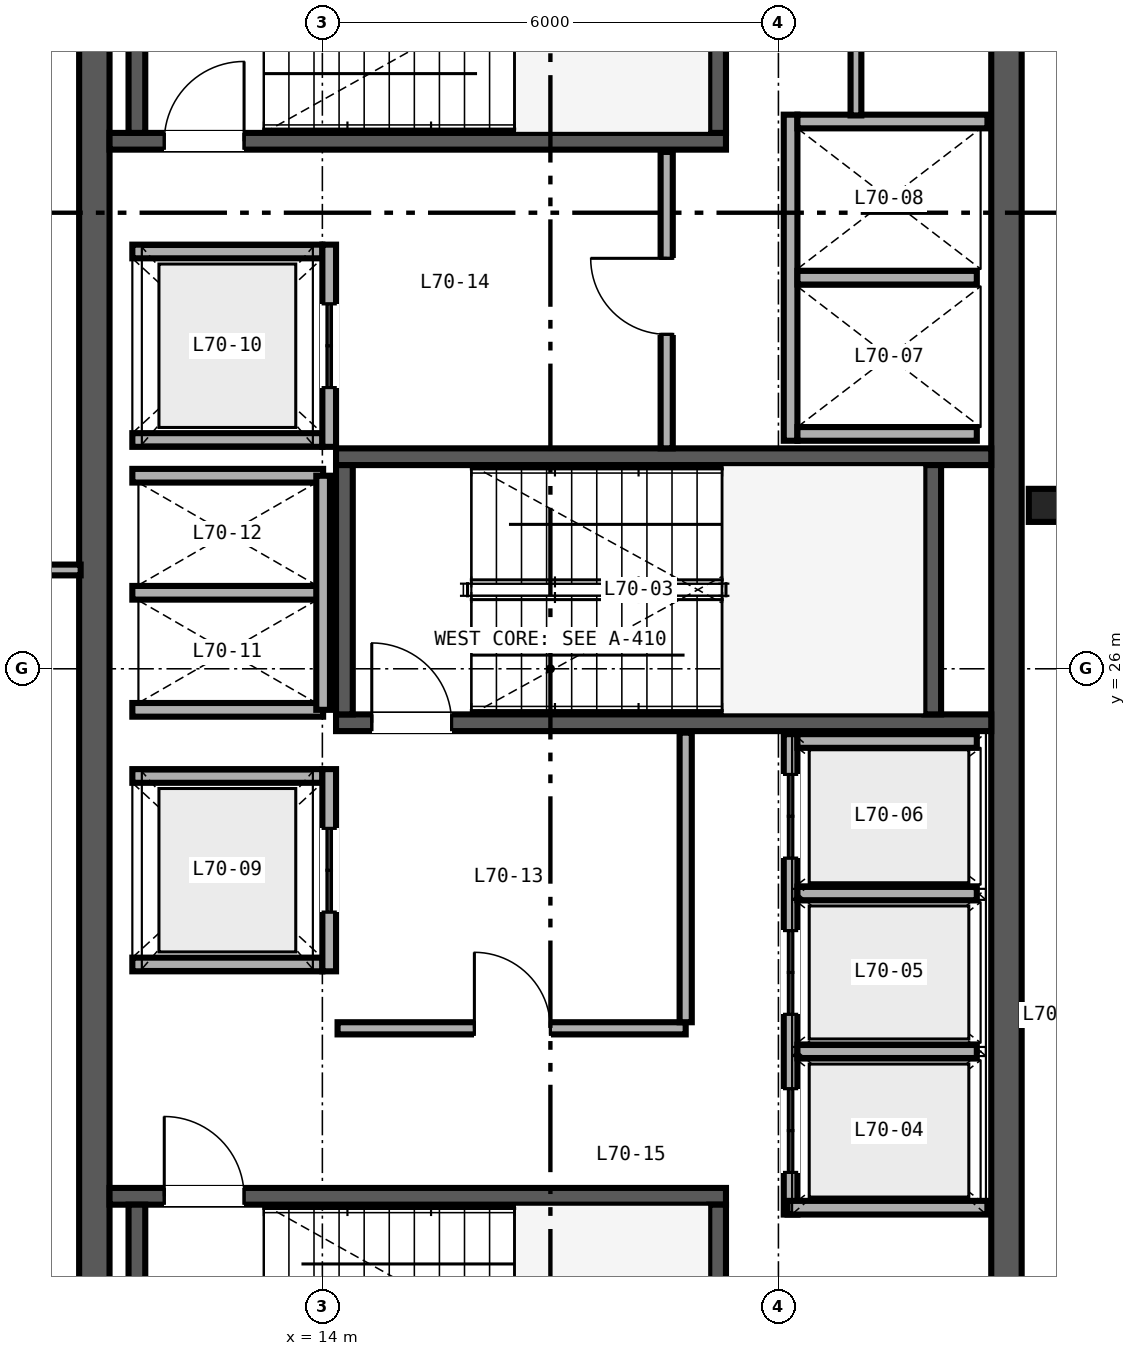
"""IFC4 building model, lengths in metres.
Left out: names, types, materials, properties, quantities, classifications, styles, units other than length and angle.
Written with IfcOpenShell. Run it as: python <this file> out.ifc"""

import sys

from ifc_helpers import new_model, si_unit, direction, frame, frame_2d, origin, origin_2d, place, context, subcontext, project, spatial, rectangle, i_section, extrude, source, transform, mapped, element, fill, save


model = new_model("IFC4")
c1 = context("Model", 3, precision=1e-05, world=origin(), true_north=direction((0.0, 1.0)))
c2 = subcontext(c1, "Body", "Model", "MODEL_VIEW")
j1 = project(units=[si_unit("LENGTHUNIT", "METRE"), si_unit("PLANEANGLEUNIT", "RADIAN")], contexts=[c1])
p1 = place(None, origin())
s1 = spatial("IfcSite", under=j1, at=p1, CompositionType="ELEMENT")
p2 = place(p1, origin())
s2 = spatial("IfcBuilding", under=s1, at=p2, CompositionType="ELEMENT")
p3 = place(p2, frame((0.0, 0.0, 276.0)))
s3 = spatial("IfcBuildingStorey", under=s2, at=p3, CompositionType="ELEMENT", Elevation=276.0)
for number, where, z_axis, x_axis in (
    (1, (11.0, 15.2, 0.0), (0.0, 0.0, 1.0), (0.0, 1.0, 0.0)),
    (2, (23.0, 15.2, 0.0), (0.0, 0.0, 1.0), (0.0, 1.0, 0.0)),
):
    element("IfcWall", number, at=place(p3, frame(where, z_axis=z_axis, x_axis=x_axis)), inside=s3, PredefinedType="SHEAR", context=c2, shape_type="SweptSolid", body=[
        extrude(rectangle(XDim=21.6, YDim=0.4, at=frame_2d((10.8, 0.0))), origin(), (0.0, 0.0, 1.0), 3.38),
    ])
p4 = place(p3, frame((11.2, 19.06, 0.0), z_axis=(0.0, 0.0, 1.0), x_axis=(1.0, 0.0, 0.0)))
e3 = element("IfcWall", 3, at=p4, inside=s3, PredefinedType="SHEAR", context=c2, shape_type="SweptSolid", body=[
    extrude(rectangle(XDim=8.11, YDim=0.22, at=frame_2d((4.055, 0.0))), origin(), (0.0, 0.0, 1.0), 3.4),
])
p5 = place(p4, frame((0.72, 0.0, 0.0)))
e4 = element("IfcOpeningElement", 4, at=p5, cuts=e3, PredefinedType="OPENING", context=c2, shape_type="SweptSolid", body=[
    extrude(rectangle(XDim=1.05, YDim=2.15, at=frame_2d((0.525, 1.075))), frame((0.0, 0.12, 0.0), z_axis=(0.0, -1.0, 0.0), x_axis=(1.0, 0.0, 0.0)), (0.0, 0.0, 1.0), 0.24),
])
for number, where, z_axis, x_axis in (
    (5, (11.56, 15.67, 0.0), (0.0, 0.0, 1.0), (0.0, 1.0, 0.0)),
    (6, (19.2, 15.67, 0.0), (0.0, 0.0, 1.0), (0.0, 1.0, 0.0)),
):
    element("IfcWall", number, at=place(p3, frame(where, z_axis=z_axis, x_axis=x_axis)), inside=s3, PredefinedType="SHEAR", context=c2, shape_type="SweptSolid", body=[
        extrude(rectangle(XDim=3.28, YDim=0.22, at=frame_2d((1.64, 0.0))), origin(), (0.0, 0.0, 1.0), 3.4),
    ])
p6 = place(p3, frame((11.2, 32.94, 0.0), z_axis=(0.0, 0.0, 1.0), x_axis=(1.0, 0.0, 0.0)))
e7 = element("IfcWall", 7, at=p6, inside=s3, PredefinedType="SHEAR", context=c2, shape_type="SweptSolid", body=[
    extrude(rectangle(XDim=8.11, YDim=0.22, at=frame_2d((4.055, 0.0))), origin(), (0.0, 0.0, 1.0), 3.4),
])
p7 = place(p6, frame((0.72, 0.0, 0.0)))
e8 = element("IfcOpeningElement", 8, at=p7, cuts=e7, PredefinedType="OPENING", context=c2, shape_type="SweptSolid", body=[
    extrude(rectangle(XDim=1.05, YDim=2.15, at=frame_2d((0.525, 1.075))), frame((0.0, 0.12, 0.0), z_axis=(0.0, -1.0, 0.0), x_axis=(1.0, 0.0, 0.0)), (0.0, 0.0, 1.0), 0.24),
])
for number, where, z_axis, x_axis in (
    (9, (11.56, 33.05, 0.0), (0.0, 0.0, 1.0), (0.0, 1.0, 0.0)),
    (10, (19.2, 33.05, 0.0), (0.0, 0.0, 1.0), (0.0, 1.0, 0.0)),
):
    element("IfcWall", number, at=place(p3, frame(where, z_axis=z_axis, x_axis=x_axis)), inside=s3, PredefinedType="SHEAR", context=c2, shape_type="SweptSolid", body=[
        extrude(rectangle(XDim=3.28, YDim=0.22, at=frame_2d((1.64, 0.0))), origin(), (0.0, 0.0, 1.0), 3.4),
    ])
p8 = place(p3, frame((14.18, 25.29, 0.0), z_axis=(0.0, 0.0, 1.0), x_axis=(1.0, 0.0, 0.0)))
e11 = element("IfcWall", 11, at=p8, inside=s3, PredefinedType="SHEAR", context=c2, shape_type="SweptSolid", body=[
    extrude(rectangle(XDim=8.62, YDim=0.22, at=frame_2d((4.31, 0.0))), origin(), (0.0, 0.0, 1.0), 3.4),
])
p9 = place(p8, frame((0.47, 0.0, 0.0)))
e12 = element("IfcOpeningElement", 12, at=p9, cuts=e11, PredefinedType="OPENING", context=c2, shape_type="SweptSolid", body=[
    extrude(rectangle(XDim=1.05, YDim=2.15, at=frame_2d((0.525, 1.075))), frame((0.0, 0.12, 0.0), z_axis=(0.0, -1.0, 0.0), x_axis=(1.0, 0.0, 0.0)), (0.0, 0.0, 1.0), 0.24),
])
p10 = place(p3, frame((14.18, 28.79, 0.0), z_axis=(0.0, 0.0, 1.0), x_axis=(1.0, 0.0, 0.0)))
e13 = element("IfcWall", 13, at=p10, inside=s3, PredefinedType="SHEAR", context=c2, shape_type="SweptSolid", body=[
    extrude(rectangle(XDim=8.62, YDim=0.22, at=frame_2d((4.31, 0.0))), origin(), (0.0, 0.0, 1.0), 3.4),
])
for number, where, z_axis, x_axis in (
    (14, (14.29, 25.4, 0.0), (0.0, 0.0, 1.0), (0.0, 1.0, 0.0)),
    (15, (22.03, 25.4, 0.0), (0.0, 0.0, 1.0), (0.0, 1.0, 0.0)),
):
    element("IfcWall", number, at=place(p3, frame(where, z_axis=z_axis, x_axis=x_axis)), inside=s3, PredefinedType="SHEAR", context=c2, shape_type="SweptSolid", body=[
        extrude(rectangle(XDim=3.28, YDim=0.22, at=frame_2d((1.64, 0.0))), origin(), (0.0, 0.0, 1.0), 3.4),
    ])
m1 = source(origin(), c2, "Body", "SweptSolid", [
    extrude(i_section(OverallWidth=0.412, OverallDepth=0.435, WebThickness=0.036, FlangeThickness=0.057, FilletRadius=0.025, at=origin_2d()), origin(), (0.0, 0.0, 1.0), 3.38),
])
p11 = place(p3, frame((23.5, 28.15, 0.0), z_axis=(0.0, 0.0, 1.0), x_axis=(1.0, 0.0, 0.0)))
e16 = element("IfcColumn", 16, at=p11, inside=s3, PredefinedType="COLUMN", context=c2, shape_type="MappedRepresentation", body=[
    mapped(m1, transform((0.0, 0.0, 0.0), scale=1.0)),
])
p12 = place(p3, frame((20.16, 18.82, 0.0), z_axis=(0.0, 0.0, 1.0), x_axis=(0.0, 1.0, 0.0)))
e17 = element("IfcWall", 17, at=p12, inside=s3, PredefinedType="SOLIDWALL", context=c2, shape_type="SweptSolid", body=[
    extrude(rectangle(XDim=6.32, YDim=0.18, at=frame_2d((3.16, 0.0))), origin(), (0.0, 0.0, 1.0), 2.48),
])
p13 = place(p12, frame((0.555, 0.0, 0.0)))
e18 = element("IfcOpeningElement", 18, at=p13, cuts=e17, PredefinedType="OPENING", context=c2, shape_type="SweptSolid", body=[
    extrude(rectangle(XDim=1.1, YDim=2.2, at=frame_2d((0.55, 1.1))), frame((0.0, 0.1, 0.0), z_axis=(0.0, -1.0, 0.0), x_axis=(1.0, 0.0, 0.0)), (0.0, 0.0, 1.0), 0.2),
])
p14 = place(p12, frame((2.635, 0.0, 0.0)))
e19 = element("IfcOpeningElement", 19, at=p14, cuts=e17, PredefinedType="OPENING", context=c2, shape_type="SweptSolid", body=[
    extrude(rectangle(XDim=1.1, YDim=2.2, at=frame_2d((0.55, 1.1))), frame((0.0, 0.1, 0.0), z_axis=(0.0, -1.0, 0.0), x_axis=(1.0, 0.0, 0.0)), (0.0, 0.0, 1.0), 0.2),
])
p15 = place(p12, frame((4.69, 0.0, 0.0)))
e20 = element("IfcOpeningElement", 20, at=p15, cuts=e17, PredefinedType="OPENING", context=c2, shape_type="SweptSolid", body=[
    extrude(rectangle(XDim=1.1, YDim=2.2, at=frame_2d((0.55, 1.1))), frame((0.0, 0.1, 0.0), z_axis=(0.0, -1.0, 0.0), x_axis=(1.0, 0.0, 0.0)), (0.0, 0.0, 1.0), 0.2),
])
p16 = place(p3, frame((20.12, 18.91, 0.0), z_axis=(0.0, 0.0, 1.0), x_axis=(1.0, 0.0, 0.0)))
e21 = element("IfcWall", 21, at=p16, inside=s3, PredefinedType="SOLIDWALL", context=c2, shape_type="SweptSolid", body=[
    extrude(rectangle(XDim=2.63, YDim=0.18, at=frame_2d((1.315, 0.0))), origin(), (0.0, 0.0, 1.0), 3.38),
])
p17 = place(p3, frame((20.25, 25.05, 0.0), z_axis=(0.0, 0.0, 1.0), x_axis=(1.0, 0.0, 0.0)))
e22 = element("IfcWall", 22, at=p17, inside=s3, PredefinedType="SOLIDWALL", context=c2, shape_type="SweptSolid", body=[
    extrude(rectangle(XDim=2.36, YDim=0.18, at=frame_2d((1.18, 0.0))), origin(), (0.0, 0.0, 1.0), 3.38),
])
p18 = place(p3, frame((20.25, 20.965, 0.0), z_axis=(0.0, 0.0, 1.0), x_axis=(1.0, 0.0, 0.0)))
e23 = element("IfcWall", 23, at=p18, inside=s3, PredefinedType="SOLIDWALL", context=c2, shape_type="SweptSolid", body=[
    extrude(rectangle(XDim=2.36, YDim=0.18, at=frame_2d((1.18, 0.0))), origin(), (0.0, 0.0, 1.0), 2.48),
])
p19 = place(p3, frame((20.25, 23.045, 0.0), z_axis=(0.0, 0.0, 1.0), x_axis=(1.0, 0.0, 0.0)))
e24 = element("IfcWall", 24, at=p19, inside=s3, PredefinedType="SOLIDWALL", context=c2, shape_type="SweptSolid", body=[
    extrude(rectangle(XDim=2.36, YDim=0.18, at=frame_2d((1.18, 0.0))), origin(), (0.0, 0.0, 1.0), 3.38),
])
p20 = place(p3, frame((20.16, 29.0, 0.0), z_axis=(0.0, 0.0, 1.0), x_axis=(0.0, 1.0, 0.0)))
e25 = element("IfcWall", 25, at=p20, inside=s3, PredefinedType="SOLIDWALL", context=c2, shape_type="SweptSolid", body=[
    extrude(rectangle(XDim=4.29, YDim=0.18, at=frame_2d((2.145, 0.0))), origin(), (0.0, 0.0, 1.0), 3.38),
])
p21 = place(p3, frame((20.25, 29.09, 0.0), z_axis=(0.0, 0.0, 1.0), x_axis=(1.0, 0.0, 0.0)))
e26 = element("IfcWall", 26, at=p21, inside=s3, PredefinedType="SOLIDWALL", context=c2, shape_type="SweptSolid", body=[
    extrude(rectangle(XDim=2.36, YDim=0.18, at=frame_2d((1.18, 0.0))), origin(), (0.0, 0.0, 1.0), 3.38),
])
p22 = place(p3, frame((20.25, 33.2, 0.0), z_axis=(0.0, 0.0, 1.0), x_axis=(1.0, 0.0, 0.0)))
e27 = element("IfcWall", 27, at=p22, inside=s3, PredefinedType="SOLIDWALL", context=c2, shape_type="SweptSolid", body=[
    extrude(rectangle(XDim=2.5, YDim=0.18, at=frame_2d((1.25, 0.0))), origin(), (0.0, 0.0, 1.0), 3.38),
])
p23 = place(p3, frame((20.25, 31.145, 0.0), z_axis=(0.0, 0.0, 1.0), x_axis=(1.0, 0.0, 0.0)))
e28 = element("IfcWall", 28, at=p23, inside=s3, PredefinedType="SOLIDWALL", context=c2, shape_type="SweptSolid", body=[
    extrude(rectangle(XDim=2.36, YDim=0.18, at=frame_2d((1.18, 0.0))), origin(), (0.0, 0.0, 1.0), 3.38),
])
for number, where, z_axis, x_axis in (
    (29, (11.5, 22.11, 0.0), (0.0, 0.0, 1.0), (1.0, 0.0, 0.0)),
    (30, (11.5, 24.59, 0.0), (0.0, 0.0, 1.0), (1.0, 0.0, 0.0)),
):
    element("IfcWall", number, at=place(p3, frame(where, z_axis=z_axis, x_axis=x_axis)), inside=s3, PredefinedType="SOLIDWALL", context=c2, shape_type="SweptSolid", body=[
        extrude(rectangle(XDim=2.5, YDim=0.18, at=frame_2d((1.25, 0.0))), origin(), (0.0, 0.0, 1.0), 3.38),
    ])
p24 = place(p3, frame((14.09, 22.02, 0.0), z_axis=(0.0, 0.0, 1.0), x_axis=(0.0, 1.0, 0.0)))
e31 = element("IfcWall", 31, at=p24, inside=s3, PredefinedType="SOLIDWALL", context=c2, shape_type="SweptSolid", body=[
    extrude(rectangle(XDim=2.66, YDim=0.18, at=frame_2d((1.33, 0.0))), origin(), (0.0, 0.0, 1.0), 3.38),
])
p25 = place(p24, frame((0.78, 0.0, 0.0)))
e32 = element("IfcOpeningElement", 32, at=p25, cuts=e31, PredefinedType="OPENING", context=c2, shape_type="SweptSolid", body=[
    extrude(rectangle(XDim=1.1, YDim=2.2, at=frame_2d((0.55, 1.1))), frame((0.0, 0.1, 0.0), z_axis=(0.0, -1.0, 0.0), x_axis=(1.0, 0.0, 0.0)), (0.0, 0.0, 1.0), 0.2),
])
for number, where, z_axis, x_axis in (
    (33, (11.5, 29.01, 0.0), (0.0, 0.0, 1.0), (1.0, 0.0, 0.0)),
    (34, (11.5, 31.49, 0.0), (0.0, 0.0, 1.0), (1.0, 0.0, 0.0)),
):
    element("IfcWall", number, at=place(p3, frame(where, z_axis=z_axis, x_axis=x_axis)), inside=s3, PredefinedType="SOLIDWALL", context=c2, shape_type="SweptSolid", body=[
        extrude(rectangle(XDim=2.5, YDim=0.18, at=frame_2d((1.25, 0.0))), origin(), (0.0, 0.0, 1.0), 3.38),
    ])
p26 = place(p3, frame((14.09, 28.92, 0.0), z_axis=(0.0, 0.0, 1.0), x_axis=(0.0, 1.0, 0.0)))
e35 = element("IfcWall", 35, at=p26, inside=s3, PredefinedType="SOLIDWALL", context=c2, shape_type="SweptSolid", body=[
    extrude(rectangle(XDim=2.66, YDim=0.18, at=frame_2d((1.33, 0.0))), origin(), (0.0, 0.0, 1.0), 3.38),
])
p27 = place(p26, frame((0.78, 0.0, 0.0)))
e36 = element("IfcOpeningElement", 36, at=p27, cuts=e35, PredefinedType="OPENING", context=c2, shape_type="SweptSolid", body=[
    extrude(rectangle(XDim=1.1, YDim=2.2, at=frame_2d((0.55, 1.1))), frame((0.0, 0.1, 0.0), z_axis=(0.0, -1.0, 0.0), x_axis=(1.0, 0.0, 0.0)), (0.0, 0.0, 1.0), 0.2),
])
for number, where, z_axis, x_axis in (
    (37, (11.5, 25.46, 0.0), (0.0, 0.0, 1.0), (1.0, 0.0, 0.0)),
    (38, (11.5, 27.0, 0.0), (0.0, 0.0, 1.0), (1.0, 0.0, 0.0)),
    (39, (11.5, 28.54, 0.0), (0.0, 0.0, 1.0), (1.0, 0.0, 0.0)),
):
    element("IfcWall", number, at=place(p3, frame(where, z_axis=z_axis, x_axis=x_axis)), inside=s3, PredefinedType="SOLIDWALL", context=c2, shape_type="SweptSolid", body=[
        extrude(rectangle(XDim=2.51, YDim=0.18, at=frame_2d((1.255, 0.0))), origin(), (0.0, 0.0, 1.0), 3.38),
    ])
p28 = place(p3, frame((14.01, 25.46, 0.0), z_axis=(0.0, 0.0, 1.0), x_axis=(0.0, 1.0, 0.0)))
e40 = element("IfcWall", 40, at=p28, inside=s3, PredefinedType="SOLIDWALL", context=c2, shape_type="SweptSolid", body=[
    extrude(rectangle(XDim=3.08, YDim=0.18, at=frame_2d((1.54, 0.0))), origin(), (0.0, 0.0, 1.0), 3.38),
])
p29 = place(p3, frame((14.2, 21.27, 0.0), z_axis=(0.0, 0.0, 1.0), x_axis=(1.0, 0.0, 0.0)))
e41 = element("IfcWall", 41, at=p29, inside=s3, PredefinedType="PARTITIONING", context=c2, shape_type="SweptSolid", body=[
    extrude(rectangle(XDim=4.58, YDim=0.16, at=frame_2d((2.29, 0.0))), origin(), (0.0, 0.0, 1.0), 3.38),
])
p30 = place(p29, frame((1.8, 0.0, 0.0)))
e42 = element("IfcOpeningElement", 42, at=p30, cuts=e41, PredefinedType="OPENING", context=c2, shape_type="SweptSolid", body=[
    extrude(rectangle(XDim=1.0, YDim=2.15, at=frame_2d((0.5, 1.075))), frame((0.0, 0.09, 0.0), z_axis=(0.0, -1.0, 0.0), x_axis=(1.0, 0.0, 0.0)), (0.0, 0.0, 1.0), 0.18),
])
p31 = place(p3, frame((18.78, 21.35, 0.0), z_axis=(0.0, 0.0, 1.0), x_axis=(0.0, 1.0, 0.0)))
e43 = element("IfcWall", 43, at=p31, inside=s3, PredefinedType="PARTITIONING", context=c2, shape_type="SweptSolid", body=[
    extrude(rectangle(XDim=3.81, YDim=0.16, at=frame_2d((1.905, 0.0))), origin(), (0.0, 0.0, 1.0), 3.38),
])
p32 = place(p3, frame((18.53, 28.9, 0.0), z_axis=(0.0, 0.0, 1.0), x_axis=(0.0, 1.0, 0.0)))
e44 = element("IfcWall", 44, at=p32, inside=s3, PredefinedType="PARTITIONING", context=c2, shape_type="SweptSolid", body=[
    extrude(rectangle(XDim=3.9, YDim=0.16, at=frame_2d((1.95, 0.0))), origin(), (0.0, 0.0, 1.0), 3.38),
])
p33 = place(p32, frame((1.5, 0.0, 0.0)))
e45 = element("IfcOpeningElement", 45, at=p33, cuts=e44, PredefinedType="OPENING", context=c2, shape_type="SweptSolid", body=[
    extrude(rectangle(XDim=1.0, YDim=2.15, at=frame_2d((0.5, 1.075))), frame((0.0, 0.09, 0.0), z_axis=(0.0, -1.0, 0.0), x_axis=(1.0, 0.0, 0.0)), (0.0, 0.0, 1.0), 0.18),
])
p34 = place(p3, frame((21.02, 33.28, 0.0), z_axis=(0.0, 0.0, 1.0), x_axis=(0.0, 1.0, 0.0)))
e46 = element("IfcWall", 46, at=p34, inside=s3, PredefinedType="PARTITIONING", context=c2, shape_type="SweptSolid", body=[
    extrude(rectangle(XDim=3.47, YDim=0.142, at=frame_2d((1.735, 0.0))), origin(), (0.0, 0.0, 1.0), 3.38),
])
p35 = place(p34, frame((1.15, 0.0, 0.0)))
e47 = element("IfcOpeningElement", 47, at=p35, cuts=e46, PredefinedType="OPENING", context=c2, shape_type="SweptSolid", body=[
    extrude(rectangle(XDim=0.84, YDim=2.1, at=frame_2d((0.42, 1.05))), frame((0.0, 0.081, 0.0), z_axis=(0.0, -1.0, 0.0), x_axis=(1.0, 0.0, 0.0)), (0.0, 0.0, 1.0), 0.162),
])
p36 = place(p3, frame((8.16, 27.3, 0.0), z_axis=(0.0, 0.0, 1.0), x_axis=(1.0, 0.0, 0.0)))
e48 = element("IfcWall", 48, at=p36, inside=s3, PredefinedType="PARTITIONING", context=c2, shape_type="SweptSolid", body=[
    extrude(rectangle(XDim=2.66, YDim=0.142, at=frame_2d((1.33, 0.0))), origin(), (0.0, 0.0, 1.0), 2.601),
])
m2 = source(origin(), c2, "Body", "SweptSolid", [
    extrude(rectangle(XDim=1.05, YDim=2.15, at=frame_2d((0.525, 1.075))), frame((0.0, 0.025, 0.0), z_axis=(0.0, -1.0, 0.0), x_axis=(1.0, 0.0, 0.0)), (0.0, 0.0, 1.0), 0.05),
])
p37 = place(p5, origin())
e49 = element("IfcDoor", 49, at=p37, inside=s3, OperationType="SINGLE_SWING_LEFT", PredefinedType="DOOR", context=c2, shape_type="MappedRepresentation", body=[
    mapped(m2, transform((0.0, 0.0, 0.0), scale=1.0)),
])
fill(e4, e49)
p38 = place(p7, origin())
e50 = element("IfcDoor", 50, at=p38, inside=s3, OperationType="SINGLE_SWING_RIGHT", PredefinedType="DOOR", context=c2, shape_type="MappedRepresentation", body=[
    mapped(m2, transform((0.0, 0.0, 0.0), scale=1.0)),
])
fill(e8, e50)
p39 = place(p9, origin())
e51 = element("IfcDoor", 51, at=p39, inside=s3, OperationType="SINGLE_SWING_LEFT", PredefinedType="DOOR", context=c2, shape_type="MappedRepresentation", body=[
    mapped(m2, transform((0.0, 0.0, 0.0), scale=1.0)),
])
fill(e12, e51)
m3 = source(origin(), c2, "Body", "SweptSolid", [
    extrude(rectangle(XDim=1.1, YDim=2.2, at=frame_2d((0.55, 1.1))), frame((0.0, 0.025, 0.0), z_axis=(0.0, -1.0, 0.0), x_axis=(1.0, 0.0, 0.0)), (0.0, 0.0, 1.0), 0.05),
])
p40 = place(p13, origin())
e52 = element("IfcDoor", 52, at=p40, inside=s3, OperationType="DOUBLE_DOOR_SLIDING", PredefinedType="DOOR", context=c2, shape_type="MappedRepresentation", body=[
    mapped(m3, transform((0.0, 0.0, 0.0), scale=1.0)),
])
fill(e18, e52)
p41 = place(p14, origin())
e53 = element("IfcDoor", 53, at=p41, inside=s3, OperationType="DOUBLE_DOOR_SLIDING", PredefinedType="DOOR", context=c2, shape_type="MappedRepresentation", body=[
    mapped(m3, transform((0.0, 0.0, 0.0), scale=1.0)),
])
fill(e19, e53)
p42 = place(p15, origin())
e54 = element("IfcDoor", 54, at=p42, inside=s3, OperationType="DOUBLE_DOOR_SLIDING", PredefinedType="DOOR", context=c2, shape_type="MappedRepresentation", body=[
    mapped(m3, transform((0.0, 0.0, 0.0), scale=1.0)),
])
fill(e20, e54)
p43 = place(p25, origin())
e55 = element("IfcDoor", 55, at=p43, inside=s3, OperationType="DOUBLE_DOOR_SLIDING", PredefinedType="DOOR", context=c2, shape_type="MappedRepresentation", body=[
    mapped(m3, transform((0.0, 0.0, 0.0), scale=1.0)),
])
fill(e32, e55)
p44 = place(p27, origin())
e56 = element("IfcDoor", 56, at=p44, inside=s3, OperationType="DOUBLE_DOOR_SLIDING", PredefinedType="DOOR", context=c2, shape_type="MappedRepresentation", body=[
    mapped(m3, transform((0.0, 0.0, 0.0), scale=1.0)),
])
fill(e36, e56)
m4 = source(origin(), c2, "Body", "SweptSolid", [
    extrude(rectangle(XDim=1.0, YDim=2.15, at=frame_2d((0.5, 1.075))), frame((0.0, 0.025, 0.0), z_axis=(0.0, -1.0, 0.0), x_axis=(1.0, 0.0, 0.0)), (0.0, 0.0, 1.0), 0.05),
])
p45 = place(p30, origin())
e57 = element("IfcDoor", 57, at=p45, inside=s3, OperationType="SINGLE_SWING_LEFT", PredefinedType="DOOR", context=c2, shape_type="MappedRepresentation", body=[
    mapped(m4, transform((0.0, 0.0, 0.0), scale=1.0)),
])
fill(e42, e57)
p46 = place(p33, origin())
e58 = element("IfcDoor", 58, at=p46, inside=s3, OperationType="SINGLE_SWING_RIGHT", PredefinedType="DOOR", context=c2, shape_type="MappedRepresentation", body=[
    mapped(m4, transform((0.0, 0.0, 0.0), scale=1.0)),
])
fill(e45, e58)
save(model, sys.argv[1])
